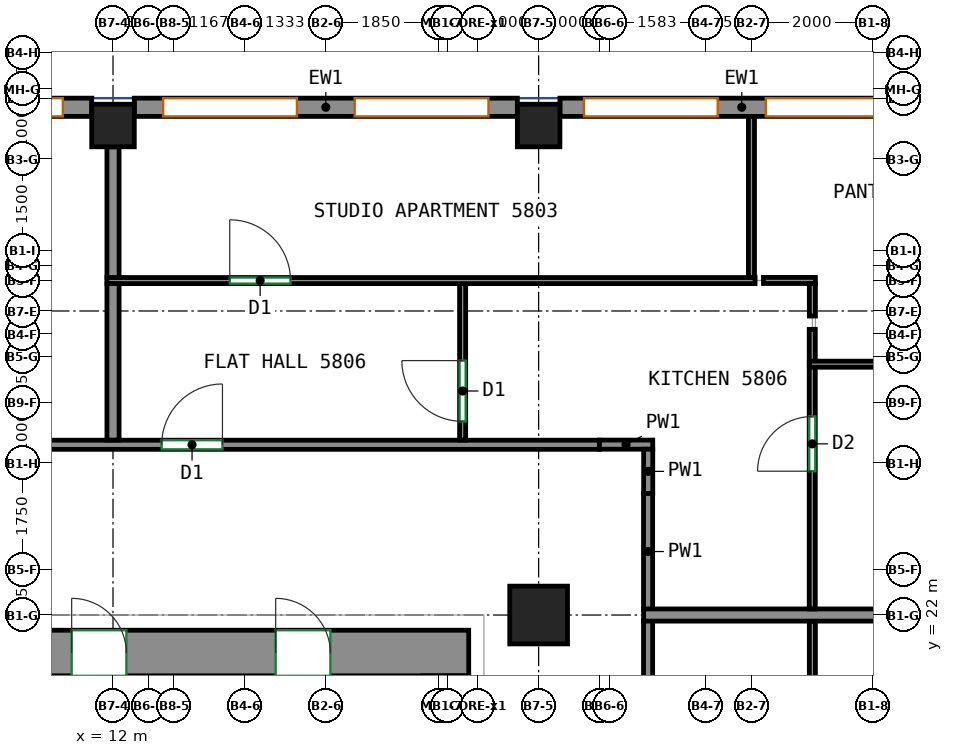
"""IFC4 building model, lengths in metres.
Left out: names, types, materials, properties, quantities, classifications, styles, units other than length and angle.
Written with IfcOpenShell. Run it as: python <this file> out.ifc"""

import sys

from ifc_helpers import new_model, si_unit, direction, frame, frame_2d, origin, origin_2d, place, context, subcontext, project, spatial, rectangle, extrude, source, transform, mapped, element, fill, save


model = new_model("IFC4")
c1 = context("Model", 3, precision=1e-05, world=origin(), true_north=direction((0.0, 1.0)))
c2 = subcontext(c1, "Body", "Model", "MODEL_VIEW")
j1 = project(units=[si_unit("LENGTHUNIT", "METRE"), si_unit("PLANEANGLEUNIT", "RADIAN")], contexts=[c1])
p1 = place(None, origin())
s1 = spatial("IfcSite", under=j1, at=p1, CompositionType="ELEMENT")
p2 = place(p1, origin())
s2 = spatial("IfcBuilding", under=s1, at=p2, CompositionType="ELEMENT")
p3 = place(p2, frame((0.0, 0.0, 242.4)))
s3 = spatial("IfcBuildingStorey", under=s2, at=p3, CompositionType="ELEMENT", Elevation=242.4)
m1 = source(origin(), c2, "Body", "SweptSolid", [
    extrude(rectangle(XDim=0.7, YDim=0.7, at=origin_2d()), origin(), (0.0, 0.0, 1.0), 3.12),
])
p4 = place(p3, frame((12.0, 30.05, 0.0), z_axis=(0.0, 0.0, 1.0), x_axis=(1.0, 0.0, 0.0)))
e1 = element("IfcColumn", 1, at=p4, inside=s3, PredefinedType="COLUMN", context=c2, shape_type="MappedRepresentation", body=[
    mapped(m1, transform((0.0, 0.0, 0.0))),
])
m2 = source(origin(), c2, "Body", "SweptSolid", [
    extrude(rectangle(XDim=0.95, YDim=0.95, at=origin_2d()), origin(), (0.0, 0.0, 1.0), 3.12),
])
p5 = place(p3, frame((19.0, 22.0, 0.0), z_axis=(0.0, 0.0, 1.0), x_axis=(1.0, 0.0, 0.0)))
e2 = element("IfcColumn", 2, at=p5, inside=s3, PredefinedType="COLUMN", context=c2, shape_type="MappedRepresentation", body=[
    mapped(m2, transform((0.0, 0.0, 0.0))),
])
p6 = place(p3, frame((19.0, 30.05, 0.0), z_axis=(0.0, 0.0, 1.0), x_axis=(1.0, 0.0, 0.0)))
e3 = element("IfcColumn", 3, at=p6, inside=s3, PredefinedType="COLUMN", context=c2, shape_type="MappedRepresentation", body=[
    mapped(m1, transform((0.0, 0.0, 0.0))),
])
m3 = source(origin(), c2, "Body", "SweptSolid", [
    extrude(rectangle(XDim=33.6, YDim=0.75, at=frame_2d((16.8, 0.0))), origin(), (0.0, 0.0, 1.0), 3.12),
])
p7 = place(p3, frame((-15.75, 21.375, 0.0), z_axis=(0.0, 0.0, 1.0), x_axis=(1.0, 0.0, 0.0)))
e4 = element("IfcWall", 4, at=p7, inside=s3, PredefinedType="SHEAR", context=c2, shape_type="MappedRepresentation", body=[
    mapped(m3, transform((0.0, 0.0, 0.0))),
])
p8 = place(p7, frame((6.581, 0.0, 0.0)))
e5 = element("IfcOpeningElement", 5, at=p8, cuts=e4, PredefinedType="OPENING", context=c2, shape_type="SweptSolid", body=[
    extrude(rectangle(XDim=0.9, YDim=2.1, at=frame_2d((0.45, 1.05))), frame((0.0, 0.385, 0.0), z_axis=(0.0, -1.0, 0.0), x_axis=(1.0, 0.0, 0.0)), (0.0, 0.0, 1.0), 0.77),
])
p9 = place(p7, frame((11.888, 0.0, 0.0)))
e6 = element("IfcOpeningElement", 6, at=p9, cuts=e4, PredefinedType="OPENING", context=c2, shape_type="SweptSolid", body=[
    extrude(rectangle(XDim=0.9, YDim=2.1, at=frame_2d((0.45, 1.05))), frame((0.0, 0.385, 0.0), z_axis=(0.0, -1.0, 0.0), x_axis=(1.0, 0.0, 0.0)), (0.0, 0.0, 1.0), 0.77),
])
p10 = place(p7, frame((17.315, 0.0, 0.0)))
e7 = element("IfcOpeningElement", 7, at=p10, cuts=e4, PredefinedType="OPENING", context=c2, shape_type="SweptSolid", body=[
    extrude(rectangle(XDim=0.9, YDim=2.1, at=frame_2d((0.45, 1.05))), frame((0.0, 0.385, 0.0), z_axis=(0.0, -1.0, 0.0), x_axis=(1.0, 0.0, 0.0)), (0.0, 0.0, 1.0), 0.77),
])
p11 = place(p7, frame((21.536, 0.0, 0.0)))
e8 = element("IfcOpeningElement", 8, at=p11, cuts=e4, PredefinedType="OPENING", context=c2, shape_type="SweptSolid", body=[
    extrude(rectangle(XDim=0.9, YDim=2.1, at=frame_2d((0.45, 1.05))), frame((0.0, 0.385, 0.0), z_axis=(0.0, -1.0, 0.0), x_axis=(1.0, 0.0, 0.0)), (0.0, 0.0, 1.0), 0.77),
])
p12 = place(p7, frame((24.537, 0.0, 0.0)))
e9 = element("IfcOpeningElement", 9, at=p12, cuts=e4, PredefinedType="OPENING", context=c2, shape_type="SweptSolid", body=[
    extrude(rectangle(XDim=0.9, YDim=2.1, at=frame_2d((0.45, 1.05))), frame((0.0, 0.385, 0.0), z_axis=(0.0, -1.0, 0.0), x_axis=(1.0, 0.0, 0.0)), (0.0, 0.0, 1.0), 0.77),
])
p13 = place(p7, frame((27.07, 0.0, 0.0)))
e10 = element("IfcOpeningElement", 10, at=p13, cuts=e4, PredefinedType="OPENING", context=c2, shape_type="SweptSolid", body=[
    extrude(rectangle(XDim=0.9, YDim=2.1, at=frame_2d((0.45, 1.05))), frame((0.0, 0.385, 0.0), z_axis=(0.0, -1.0, 0.0), x_axis=(1.0, 0.0, 0.0)), (0.0, 0.0, 1.0), 0.77),
])
p14 = place(p7, frame((2.275, 0.0, 0.0)))
e11 = element("IfcOpeningElement", 11, at=p14, cuts=e4, PredefinedType="OPENING", context=c2, shape_type="SweptSolid", body=[
    extrude(rectangle(XDim=0.9, YDim=2.1, at=frame_2d((0.45, 1.05))), frame((0.0, 0.385, 0.0), z_axis=(0.0, -1.0, 0.0), x_axis=(1.0, 0.0, 0.0)), (0.0, 0.0, 1.0), 0.77),
])
p15 = place(p7, frame((30.425, 0.0, 0.0)))
e12 = element("IfcOpeningElement", 12, at=p15, cuts=e4, PredefinedType="OPENING", context=c2, shape_type="SweptSolid", body=[
    extrude(rectangle(XDim=0.9, YDim=2.1, at=frame_2d((0.45, 1.05))), frame((0.0, 0.385, 0.0), z_axis=(0.0, -1.0, 0.0), x_axis=(1.0, 0.0, 0.0)), (0.0, 0.0, 1.0), 0.77),
])
m4 = source(origin(), c2, "Body", "SweptSolid", [
    extrude(rectangle(XDim=5.982, YDim=0.3, at=frame_2d((2.991, 0.0))), origin(), (0.0, 0.0, 1.0), 3.12),
])
p16 = place(p3, frame((25.332, 30.35, 0.0), z_axis=(0.0, 0.0, 1.0), x_axis=(-1.0, 0.0, 0.0)))
e13 = element("IfcWall", 13, at=p16, inside=s3, PredefinedType="SOLIDWALL", context=c2, shape_type="MappedRepresentation", body=[
    mapped(m4, transform((0.0, 0.0, 0.0))),
])
p17 = place(p16, frame((0.396, 0.0, 0.8)))
e14 = element("IfcOpeningElement", 14, at=p17, cuts=e13, PredefinedType="OPENING", context=c2, shape_type="SweptSolid", body=[
    extrude(rectangle(XDim=2.2, YDim=2.05, at=frame_2d((1.1, 1.025))), frame((0.0, 0.16, 0.0), z_axis=(0.0, -1.0, 0.0), x_axis=(1.0, 0.0, 0.0)), (0.0, 0.0, 1.0), 0.32),
])
p18 = place(p16, frame((3.386, 0.0, 0.8)))
e15 = element("IfcOpeningElement", 15, at=p18, cuts=e13, PredefinedType="OPENING", context=c2, shape_type="SweptSolid", body=[
    extrude(rectangle(XDim=2.2, YDim=2.05, at=frame_2d((1.1, 1.025))), frame((0.0, 0.16, 0.0), z_axis=(0.0, -1.0, 0.0), x_axis=(1.0, 0.0, 0.0)), (0.0, 0.0, 1.0), 0.32),
])
m5 = source(origin(), c2, "Body", "SweptSolid", [
    extrude(rectangle(XDim=6.3, YDim=0.3, at=frame_2d((3.15, 0.0))), origin(), (0.0, 0.0, 1.0), 3.12),
])
p19 = place(p3, frame((18.65, 30.35, 0.0), z_axis=(0.0, 0.0, 1.0), x_axis=(-1.0, 0.0, 0.0)))
e16 = element("IfcWall", 16, at=p19, inside=s3, PredefinedType="SOLIDWALL", context=c2, shape_type="MappedRepresentation", body=[
    mapped(m5, transform((0.0, 0.0, 0.0))),
])
p20 = place(p19, frame((0.475, 0.0, 0.8)))
e17 = element("IfcOpeningElement", 17, at=p20, cuts=e16, PredefinedType="OPENING", context=c2, shape_type="SweptSolid", body=[
    extrude(rectangle(XDim=2.2, YDim=2.05, at=frame_2d((1.1, 1.025))), frame((0.0, 0.16, 0.0), z_axis=(0.0, -1.0, 0.0), x_axis=(1.0, 0.0, 0.0)), (0.0, 0.0, 1.0), 0.32),
])
p21 = place(p19, frame((3.625, 0.0, 0.8)))
e18 = element("IfcOpeningElement", 18, at=p21, cuts=e16, PredefinedType="OPENING", context=c2, shape_type="SweptSolid", body=[
    extrude(rectangle(XDim=2.2, YDim=2.05, at=frame_2d((1.1, 1.025))), frame((0.0, 0.16, 0.0), z_axis=(0.0, -1.0, 0.0), x_axis=(1.0, 0.0, 0.0)), (0.0, 0.0, 1.0), 0.32),
])
p22 = place(p3, frame((11.65, 30.35, 0.0), z_axis=(0.0, 0.0, 1.0), x_axis=(-1.0, 0.0, 0.0)))
e19 = element("IfcWall", 19, at=p22, inside=s3, PredefinedType="SOLIDWALL", context=c2, shape_type="MappedRepresentation", body=[
    mapped(m5, transform((0.0, 0.0, 0.0))),
])
p23 = place(p22, frame((0.475, 0.0, 0.8)))
e20 = element("IfcOpeningElement", 20, at=p23, cuts=e19, PredefinedType="OPENING", context=c2, shape_type="SweptSolid", body=[
    extrude(rectangle(XDim=2.2, YDim=2.05, at=frame_2d((1.1, 1.025))), frame((0.0, 0.16, 0.0), z_axis=(0.0, -1.0, 0.0), x_axis=(1.0, 0.0, 0.0)), (0.0, 0.0, 1.0), 0.32),
])
p24 = place(p22, frame((3.625, 0.0, 0.8)))
e21 = element("IfcOpeningElement", 21, at=p24, cuts=e19, PredefinedType="OPENING", context=c2, shape_type="SweptSolid", body=[
    extrude(rectangle(XDim=2.2, YDim=2.05, at=frame_2d((1.1, 1.025))), frame((0.0, 0.16, 0.0), z_axis=(0.0, -1.0, 0.0), x_axis=(1.0, 0.0, 0.0)), (0.0, 0.0, 1.0), 0.32),
])
p25 = place(p3, frame((20.8, 19.592, 0.0), z_axis=(0.0, 0.0, 1.0), x_axis=(0.0, 1.0, 0.0)))
e22 = element("IfcWall", 22, at=p25, inside=s3, PredefinedType="PARTITIONING", context=c2, shape_type="SweptSolid", body=[
    extrude(rectangle(XDim=2.318, YDim=0.15, at=frame_2d((1.159, 0.0))), origin(), (0.0, 0.0, 1.0), 3.12),
])
p26 = place(p3, frame((20.877, 24.802, 0.0), z_axis=(0.0, 0.0, 1.0), x_axis=(-1.0, 0.0, 0.0)))
e23 = element("IfcWall", 23, at=p26, inside=s3, PredefinedType="PARTITIONING", context=c2, shape_type="SweptSolid", body=[
    extrude(rectangle(XDim=0.879, YDim=0.15, at=frame_2d((0.439, 0.0))), origin(), (0.0, 0.0, 1.0), 3.12),
])
p27 = place(p3, frame((20.802, 23.998, 0.0), z_axis=(0.0, 0.0, 1.0), x_axis=(0.0, 1.0, 0.0)))
e24 = element("IfcWall", 24, at=p27, inside=s3, PredefinedType="PARTITIONING", context=c2, shape_type="SweptSolid", body=[
    extrude(rectangle(XDim=0.729, YDim=0.15, at=frame_2d((0.365, 0.0))), origin(), (0.0, 0.0, 1.0), 3.12),
])
p28 = place(p3, frame((20.8, 22.09, 0.0), z_axis=(0.0, 0.0, 1.0), x_axis=(0.0, 1.0, 0.0)))
e25 = element("IfcWall", 25, at=p28, inside=s3, PredefinedType="PARTITIONING", context=c2, shape_type="SweptSolid", body=[
    extrude(rectangle(XDim=1.908, YDim=0.15, at=frame_2d((0.954, 0.0))), origin(), (0.0, 0.0, 1.0), 3.12),
])
p29 = place(p3, frame((-16.075, 24.8, 0.0), z_axis=(0.0, 0.0, 1.0), x_axis=(1.0, 0.0, 0.0)))
e26 = element("IfcWall", 26, at=p29, inside=s3, PredefinedType="PARTITIONING", context=c2, shape_type="SweptSolid", body=[
    extrude(rectangle(XDim=36.073, YDim=0.15, at=frame_2d((18.037, 0.0))), origin(), (0.0, 0.0, 1.0), 3.12),
])
p30 = place(p29, frame((14.274, 0.0, 0.0)))
e27 = element("IfcOpeningElement", 27, at=p30, cuts=e26, PredefinedType="OPENING", context=c2, shape_type="SweptSolid", body=[
    extrude(rectangle(XDim=0.9, YDim=2.1, at=frame_2d((0.45, 1.05))), frame((0.0, 0.085, 0.0), z_axis=(0.0, -1.0, 0.0), x_axis=(1.0, 0.0, 0.0)), (0.0, 0.0, 1.0), 0.17),
])
p31 = place(p29, frame((28.875, 0.0, 0.0)))
e28 = element("IfcOpeningElement", 28, at=p31, cuts=e26, PredefinedType="OPENING", context=c2, shape_type="SweptSolid", body=[
    extrude(rectangle(XDim=1.0, YDim=2.1, at=frame_2d((0.5, 1.05))), frame((0.0, 0.085, 0.0), z_axis=(0.0, -1.0, 0.0), x_axis=(1.0, 0.0, 0.0)), (0.0, 0.0, 1.0), 0.17),
])
p32 = place(p3, frame((23.502, 19.592, 0.0), z_axis=(0.0, 0.0, 1.0), x_axis=(0.0, 1.0, 0.0)))
e29 = element("IfcWall", 29, at=p32, inside=s3, PredefinedType="PARTITIONING", context=c2, shape_type="SweptSolid", body=[
    extrude(rectangle(XDim=2.308, YDim=0.1, at=frame_2d((1.154, 0.0))), origin(), (0.0, 0.0, 1.0), 3.12),
])
p33 = place(p3, frame((20.727, 22.0, 0.0), z_axis=(0.0, 0.0, 1.0), x_axis=(1.0, 0.0, 0.0)))
e30 = element("IfcWall", 30, at=p33, inside=s3, PredefinedType="PARTITIONING", context=c2, shape_type="SweptSolid", body=[
    extrude(rectangle(XDim=7.973, YDim=0.2, at=frame_2d((3.986, 0.0))), origin(), (0.0, 0.0, 1.0), 2.57),
])
p34 = place(p3, frame((17.75, 24.877, 0.0), z_axis=(0.0, 0.0, 1.0), x_axis=(0.0, 1.0, 0.0)))
e31 = element("IfcWall", 31, at=p34, inside=s3, PredefinedType="PARTITIONING", context=c2, shape_type="SweptSolid", body=[
    extrude(rectangle(XDim=2.573, YDim=0.1, at=frame_2d((1.287, 0.0))), origin(), (0.0, 0.0, 1.0), 3.12),
])
p35 = place(p34, frame((0.307, 0.0, 0.0)))
e32 = element("IfcOpeningElement", 32, at=p35, cuts=e31, PredefinedType="OPENING", context=c2, shape_type="SweptSolid", body=[
    extrude(rectangle(XDim=1.0, YDim=2.1, at=frame_2d((0.5, 1.05))), frame((0.0, 0.06, 0.0), z_axis=(0.0, -1.0, 0.0), x_axis=(1.0, 0.0, 0.0)), (0.0, 0.0, 1.0), 0.12),
])
p36 = place(p3, frame((11.9, 27.5, 0.0), z_axis=(0.0, 0.0, 1.0), x_axis=(1.0, 0.0, 0.0)))
e33 = element("IfcWall", 33, at=p36, inside=s3, PredefinedType="PARTITIONING", context=c2, shape_type="SweptSolid", body=[
    extrude(rectangle(XDim=10.66, YDim=0.1, at=frame_2d((5.33, 0.0))), origin(), (0.0, 0.0, 1.0), 3.12),
])
p37 = place(p36, frame((2.02, 0.0, 0.0)))
e34 = element("IfcOpeningElement", 34, at=p37, cuts=e33, PredefinedType="OPENING", context=c2, shape_type="SweptSolid", body=[
    extrude(rectangle(XDim=1.0, YDim=2.1, at=frame_2d((0.5, 1.05))), frame((0.0, 0.06, 0.0), z_axis=(0.0, -1.0, 0.0), x_axis=(1.0, 0.0, 0.0)), (0.0, 0.0, 1.0), 0.12),
])
p38 = place(p3, frame((12.0, 24.877, 0.0), z_axis=(0.0, 0.0, 1.0), x_axis=(0.0, 1.0, 0.0)))
e35 = element("IfcWall", 35, at=p38, inside=s3, PredefinedType="PARTITIONING", context=c2, shape_type="SweptSolid", body=[
    extrude(rectangle(XDim=2.573, YDim=0.2, at=frame_2d((1.287, 0.0))), origin(), (0.0, 0.0, 1.0), 3.12),
])
p39 = place(p3, frame((23.5, 22.1, 0.0), z_axis=(0.0, 0.0, 1.0), x_axis=(0.0, 1.0, 0.0)))
e36 = element("IfcWall", 36, at=p39, inside=s3, PredefinedType="PARTITIONING", context=c2, shape_type="SweptSolid", body=[
    extrude(rectangle(XDim=3.985, YDim=0.1, at=frame_2d((1.992, 0.0))), origin(), (0.0, 0.0, 1.0), 3.12),
])
p40 = place(p39, frame((2.265, 0.0, 0.0)))
e37 = element("IfcOpeningElement", 37, at=p40, cuts=e36, PredefinedType="OPENING", context=c2, shape_type="SweptSolid", body=[
    extrude(rectangle(XDim=0.9, YDim=2.1, at=frame_2d((0.45, 1.05))), frame((0.0, 0.06, 0.0), z_axis=(0.0, -1.0, 0.0), x_axis=(1.0, 0.0, 0.0)), (0.0, 0.0, 1.0), 0.12),
])
p41 = place(p3, frame((23.552, 27.502, 0.0), z_axis=(0.0, 0.0, 1.0), x_axis=(-1.0, 0.0, 0.0)))
e38 = element("IfcWall", 38, at=p41, inside=s3, PredefinedType="PARTITIONING", context=c2, shape_type="SweptSolid", body=[
    extrude(rectangle(XDim=0.854, YDim=0.1, at=frame_2d((0.427, 0.0))), origin(), (0.0, 0.0, 1.0), 3.12),
])
p42 = place(p3, frame((23.502, 26.917, 0.0), z_axis=(0.0, 0.0, 1.0), x_axis=(0.0, 1.0, 0.0)))
e39 = element("IfcWall", 39, at=p42, inside=s3, PredefinedType="PARTITIONING", context=c2, shape_type="SweptSolid", body=[
    extrude(rectangle(XDim=0.535, YDim=0.1, at=frame_2d((0.268, 0.0))), origin(), (0.0, 0.0, 1.0), 3.12),
])
p43 = place(p3, frame((23.5, 26.165, 0.0), z_axis=(0.0, 0.0, 1.0), x_axis=(0.0, 1.0, 0.0)))
e40 = element("IfcWall", 40, at=p43, inside=s3, PredefinedType="PARTITIONING", context=c2, shape_type="SweptSolid", body=[
    extrude(rectangle(XDim=0.533, YDim=0.1, at=frame_2d((0.267, 0.0))), origin(), (0.0, 0.0, 1.0), 3.12),
])
p44 = place(p3, frame((22.5, 27.552, 0.0), z_axis=(0.0, 0.0, 1.0), x_axis=(0.0, 1.0, 0.0)))
e41 = element("IfcWall", 41, at=p44, inside=s3, PredefinedType="PARTITIONING", context=c2, shape_type="SweptSolid", body=[
    extrude(rectangle(XDim=2.698, YDim=0.1, at=frame_2d((1.349, 0.0))), origin(), (0.0, 0.0, 1.0), 3.12),
])
p45 = place(p3, frame((12.0, 27.552, 0.0), z_axis=(0.0, 0.0, 1.0), x_axis=(0.0, 1.0, 0.0)))
e42 = element("IfcWall", 42, at=p45, inside=s3, PredefinedType="PARTITIONING", context=c2, shape_type="SweptSolid", body=[
    extrude(rectangle(XDim=2.148, YDim=0.2, at=frame_2d((1.074, 0.0))), origin(), (0.0, 0.0, 1.0), 3.12),
])
p46 = place(p3, frame((29.25, 26.125, 0.0), z_axis=(0.0, 0.0, 1.0), x_axis=(-1.0, 0.0, 0.0)))
e43 = element("IfcWall", 43, at=p46, inside=s3, PredefinedType="PARTITIONING", context=c2, shape_type="SweptSolid", body=[
    extrude(rectangle(XDim=5.798, YDim=0.1, at=frame_2d((2.899, 0.0))), origin(), (0.0, 0.0, 1.0), 3.12),
])
p47 = place(p46, frame((2.142, 0.0, 0.0)))
e44 = element("IfcOpeningElement", 44, at=p47, cuts=e43, PredefinedType="OPENING", context=c2, shape_type="SweptSolid", body=[
    extrude(rectangle(XDim=0.9, YDim=2.1, at=frame_2d((0.45, 1.05))), frame((0.0, 0.06, 0.0), z_axis=(0.0, -1.0, 0.0), x_axis=(1.0, 0.0, 0.0)), (0.0, 0.0, 1.0), 0.12),
])
p48 = place(p17, origin())
e45 = element("IfcWindow", 45, at=p48, inside=s3, PartitioningType="SINGLE_PANEL", PredefinedType="WINDOW", context=c2, shape_type="SweptSolid", body=[
    extrude(rectangle(XDim=2.2, YDim=2.05, at=frame_2d((1.1, 1.025))), frame((0.0, 0.03, 0.0), z_axis=(0.0, -1.0, 0.0), x_axis=(1.0, 0.0, 0.0)), (0.0, 0.0, 1.0), 0.06),
])
fill(e14, e45)
p49 = place(p18, origin())
e46 = element("IfcWindow", 46, at=p49, inside=s3, PartitioningType="SINGLE_PANEL", PredefinedType="WINDOW", context=c2, shape_type="SweptSolid", body=[
    extrude(rectangle(XDim=2.2, YDim=2.05, at=frame_2d((1.1, 1.025))), frame((0.0, 0.03, 0.0), z_axis=(0.0, -1.0, 0.0), x_axis=(1.0, 0.0, 0.0)), (0.0, 0.0, 1.0), 0.06),
])
fill(e15, e46)
p50 = place(p20, origin())
e47 = element("IfcWindow", 47, at=p50, inside=s3, PartitioningType="SINGLE_PANEL", PredefinedType="WINDOW", context=c2, shape_type="SweptSolid", body=[
    extrude(rectangle(XDim=2.2, YDim=2.05, at=frame_2d((1.1, 1.025))), frame((0.0, 0.03, 0.0), z_axis=(0.0, -1.0, 0.0), x_axis=(1.0, 0.0, 0.0)), (0.0, 0.0, 1.0), 0.06),
])
fill(e17, e47)
p51 = place(p21, origin())
e48 = element("IfcWindow", 48, at=p51, inside=s3, PartitioningType="SINGLE_PANEL", PredefinedType="WINDOW", context=c2, shape_type="SweptSolid", body=[
    extrude(rectangle(XDim=2.2, YDim=2.05, at=frame_2d((1.1, 1.025))), frame((0.0, 0.03, 0.0), z_axis=(0.0, -1.0, 0.0), x_axis=(1.0, 0.0, 0.0)), (0.0, 0.0, 1.0), 0.06),
])
fill(e18, e48)
p52 = place(p23, origin())
e49 = element("IfcWindow", 49, at=p52, inside=s3, PartitioningType="SINGLE_PANEL", PredefinedType="WINDOW", context=c2, shape_type="SweptSolid", body=[
    extrude(rectangle(XDim=2.2, YDim=2.05, at=frame_2d((1.1, 1.025))), frame((0.0, 0.03, 0.0), z_axis=(0.0, -1.0, 0.0), x_axis=(1.0, 0.0, 0.0)), (0.0, 0.0, 1.0), 0.06),
])
fill(e20, e49)
p53 = place(p13, origin())
e50 = element("IfcDoor", 50, at=p53, inside=s3, OperationType="SINGLE_SWING_LEFT", PredefinedType="DOOR", context=c2, shape_type="SweptSolid", body=[
    extrude(rectangle(XDim=0.9, YDim=2.1, at=frame_2d((0.45, 1.05))), frame((0.0, -0.23, 0.0), z_axis=(0.0, -1.0, 0.0), x_axis=(1.0, 0.0, 0.0)), (0.0, 0.0, 1.0), 0.05),
])
fill(e10, e50)
p54 = place(p15, origin())
e51 = element("IfcDoor", 51, at=p54, inside=s3, OperationType="SINGLE_SWING_LEFT", PredefinedType="DOOR", context=c2, shape_type="SweptSolid", body=[
    extrude(rectangle(XDim=0.9, YDim=2.1, at=frame_2d((0.45, 1.05))), frame((0.0, -0.23, 0.0), z_axis=(0.0, -1.0, 0.0), x_axis=(1.0, 0.0, 0.0)), (0.0, 0.0, 1.0), 0.05),
])
fill(e12, e51)
p55 = place(p31, origin())
e52 = element("IfcDoor", 52, at=p55, inside=s3, OperationType="SINGLE_SWING_RIGHT", PredefinedType="DOOR", context=c2, shape_type="SweptSolid", body=[
    extrude(rectangle(XDim=1.0, YDim=2.1, at=frame_2d((0.5, 1.05))), frame((0.0, 0.025, 0.0), z_axis=(0.0, -1.0, 0.0), x_axis=(1.0, 0.0, 0.0)), (0.0, 0.0, 1.0), 0.05),
])
fill(e28, e52)
p56 = place(p40, origin())
e53 = element("IfcDoor", 53, at=p56, inside=s3, OperationType="SINGLE_SWING_LEFT", PredefinedType="DOOR", context=c2, shape_type="SweptSolid", body=[
    extrude(rectangle(XDim=0.9, YDim=2.1, at=frame_2d((0.45, 1.05))), frame((0.0, 0.025, 0.0), z_axis=(0.0, -1.0, 0.0), x_axis=(1.0, 0.0, 0.0)), (0.0, 0.0, 1.0), 0.05),
])
fill(e37, e53)
p57 = place(p35, origin())
e54 = element("IfcDoor", 54, at=p57, inside=s3, OperationType="SINGLE_SWING_RIGHT", PredefinedType="DOOR", context=c2, shape_type="SweptSolid", body=[
    extrude(rectangle(XDim=1.0, YDim=2.1, at=frame_2d((0.5, 1.05))), frame((0.0, 0.025, 0.0), z_axis=(0.0, -1.0, 0.0), x_axis=(1.0, 0.0, 0.0)), (0.0, 0.0, 1.0), 0.05),
])
fill(e32, e54)
p58 = place(p37, origin())
e55 = element("IfcDoor", 55, at=p58, inside=s3, OperationType="SINGLE_SWING_LEFT", PredefinedType="DOOR", context=c2, shape_type="SweptSolid", body=[
    extrude(rectangle(XDim=1.0, YDim=2.1, at=frame_2d((0.5, 1.05))), frame((0.0, 0.025, 0.0), z_axis=(0.0, -1.0, 0.0), x_axis=(1.0, 0.0, 0.0)), (0.0, 0.0, 1.0), 0.05),
])
fill(e34, e55)
save(model, sys.argv[1])
